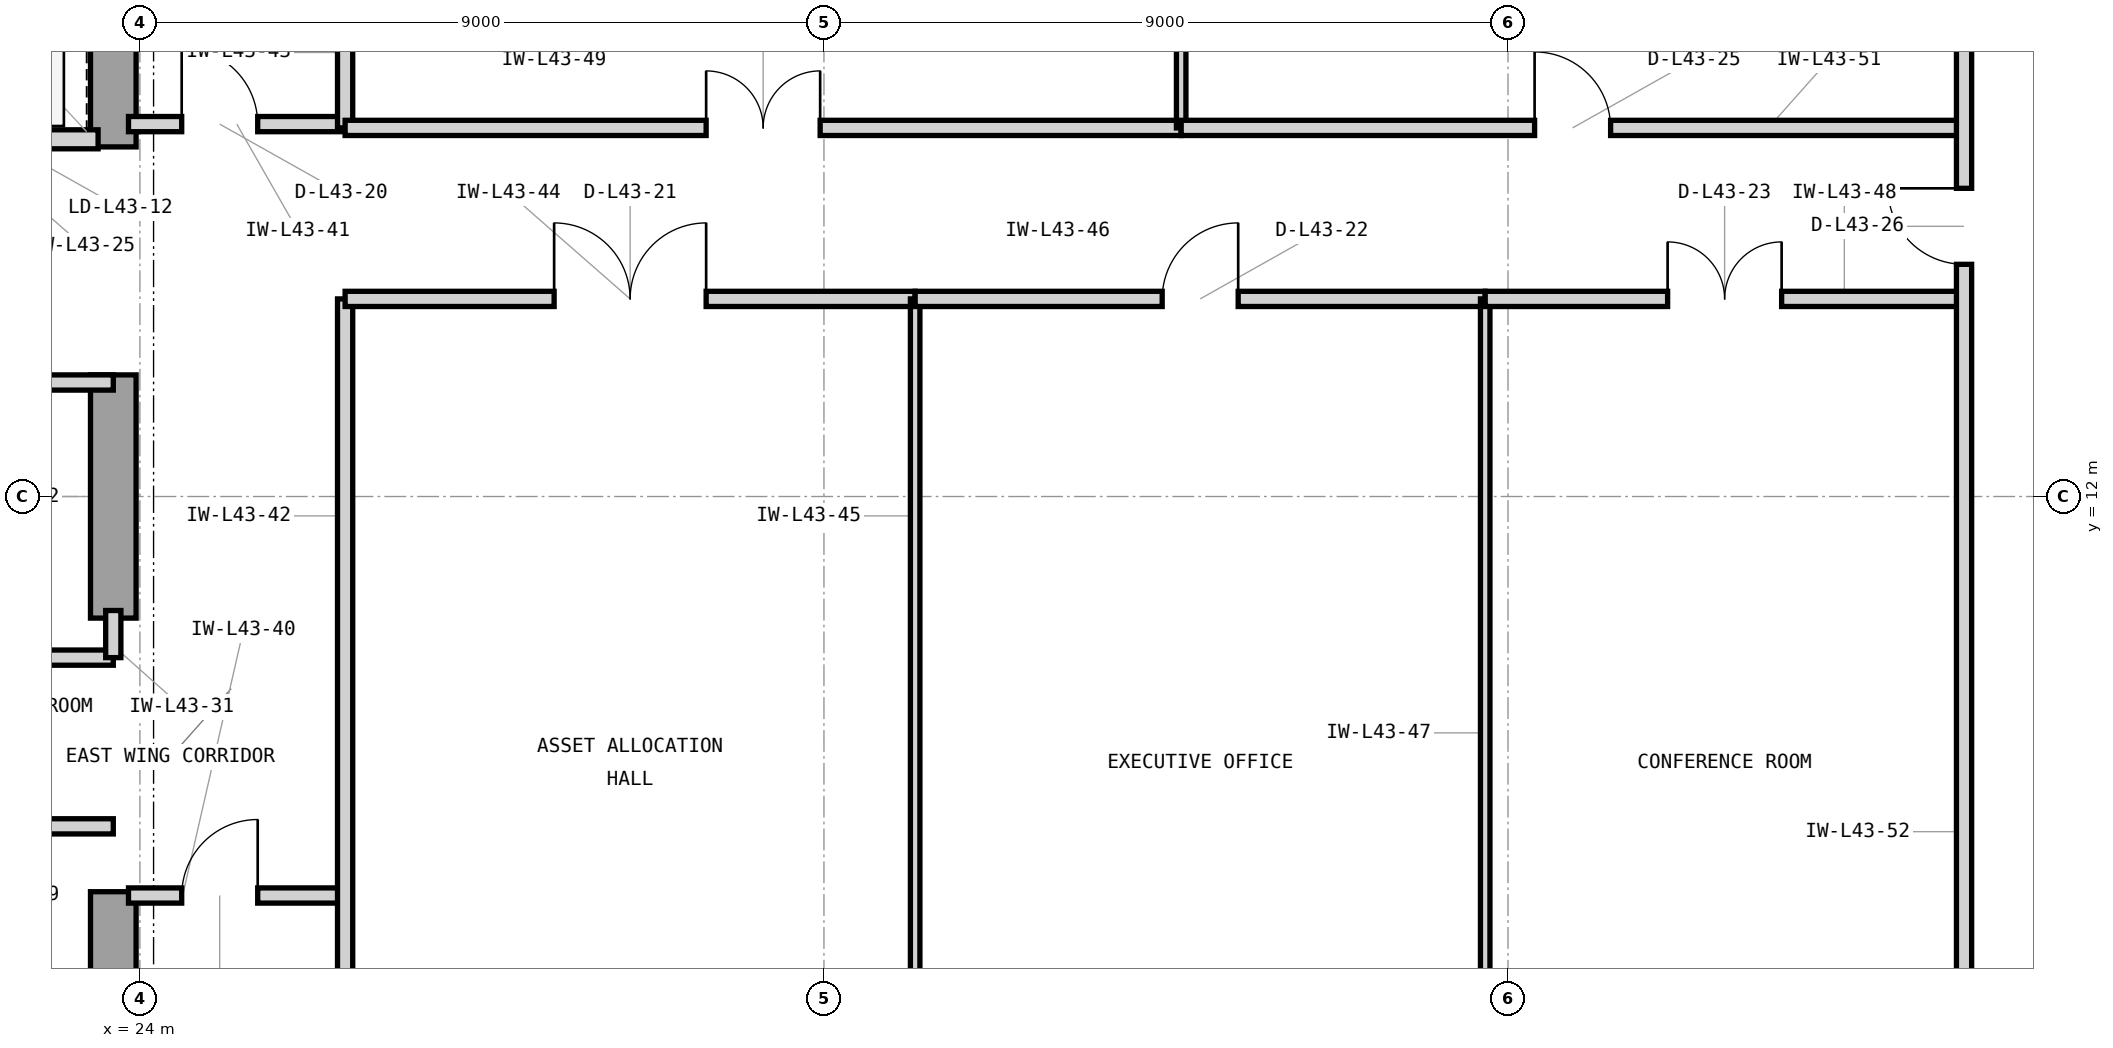
"""IFC4 building model, lengths in metres.
Left out: names, types, materials, properties, quantities, classifications, styles, units other than length and angle.
Written with IfcOpenShell. Run it as: python <this file> out.ifc"""

import sys

from ifc_helpers import new_model, si_unit, direction, frame, frame_2d, origin, place, context, subcontext, project, spatial, rectangle, extrude, element, fill, save


model = new_model("IFC4")
c1 = context("Model", 3, precision=1e-05, world=origin(), true_north=direction((0.0, 1.0)))
c2 = subcontext(c1, "Body", "Model", "MODEL_VIEW")
j1 = project(units=[si_unit("LENGTHUNIT", "METRE"), si_unit("PLANEANGLEUNIT", "RADIAN")], contexts=[c1])
p1 = place(None, origin())
s1 = spatial("IfcSite", under=j1, at=p1, CompositionType="ELEMENT")
p2 = place(p1, origin())
s2 = spatial("IfcBuilding", under=s1, at=p2, CompositionType="ELEMENT")
p3 = place(p2, frame((0.0, 0.0, 180.0)))
s3 = spatial("IfcBuildingStorey", under=s2, at=p3, CompositionType="ELEMENT", Elevation=180.0)
p4 = place(p3, frame((23.65, 3.65, 0.0), z_axis=(0.0, 0.0, 1.0), x_axis=(0.0, 1.0, 0.0)))
e1 = element("IfcWall", 1, at=p4, inside=s3, PredefinedType="SHEAR", context=c2, shape_type="SweptSolid", body=[
    extrude(rectangle(XDim=3.15, YDim=0.6, at=frame_2d((1.575, 0.0))), origin(), (0.0, 0.0, 1.0), 3.9),
])
p5 = place(p3, frame((23.65, 10.4, 0.0), z_axis=(0.0, 0.0, 1.0), x_axis=(0.0, 1.0, 0.0)))
e2 = element("IfcWall", 2, at=p5, inside=s3, PredefinedType="SHEAR", context=c2, shape_type="SweptSolid", body=[
    extrude(rectangle(XDim=3.2, YDim=0.6, at=frame_2d((1.6, 0.0))), origin(), (0.0, 0.0, 1.0), 3.9),
])
p6 = place(p3, frame((23.65, 16.6, 0.0), z_axis=(0.0, 0.0, 1.0), x_axis=(0.0, 1.0, 0.0)))
e3 = element("IfcWall", 3, at=p6, inside=s3, PredefinedType="SHEAR", context=c2, shape_type="SweptSolid", body=[
    extrude(rectangle(XDim=4.05, YDim=0.6, at=frame_2d((2.025, 0.0))), origin(), (0.0, 0.0, 1.0), 3.9),
])
p7 = place(p3, frame((21.05, 16.7, 0.0), z_axis=(0.0, 0.0, 1.0), x_axis=(1.0, 0.0, 0.0)))
e4 = element("IfcWall", 4, at=p7, inside=s3, PredefinedType="PARTITIONING", context=c2, shape_type="SweptSolid", body=[
    extrude(rectangle(XDim=2.4, YDim=0.25, at=frame_2d((1.2, 0.0))), origin(), (0.0, 0.0, 1.0), 3.283),
])
p8 = place(p7, frame((0.52, 0.0, 0.0)))
e5 = element("IfcOpeningElement", 5, at=p8, cuts=e4, PredefinedType="OPENING", context=c2, shape_type="SweptSolid", body=[
    extrude(rectangle(XDim=1.15, YDim=2.25, at=frame_2d((0.575, 1.125))), frame((0.0, 0.135, 0.0), z_axis=(0.0, -1.0, 0.0), x_axis=(1.0, 0.0, 0.0)), (0.0, 0.0, 1.0), 0.27),
])
p9 = place(p3, frame((20.85, 7.66, 0.0), z_axis=(0.0, 0.0, 1.0), x_axis=(1.0, 0.0, 0.0)))
e6 = element("IfcWall", 6, at=p9, inside=s3, PredefinedType="PARTITIONING", context=c2, shape_type="SweptSolid", body=[
    extrude(rectangle(XDim=2.8, YDim=0.2, at=frame_2d((1.4, 0.0))), origin(), (0.0, 0.0, 1.0), 3.69),
])
p10 = place(p9, frame((0.95, 0.0, 0.0)))
e7 = element("IfcOpeningElement", 7, at=p10, cuts=e6, PredefinedType="OPENING", context=c2, shape_type="SweptSolid", body=[
    extrude(rectangle(XDim=0.9, YDim=2.1, at=frame_2d((0.45, 1.05))), frame((0.0, 0.11, 0.0), z_axis=(0.0, -1.0, 0.0), x_axis=(1.0, 0.0, 0.0)), (0.0, 0.0, 1.0), 0.22),
])
p11 = place(p3, frame((14.825, 9.88, 0.0), z_axis=(0.0, 0.0, 1.0), x_axis=(1.0, 0.0, 0.0)))
e8 = element("IfcWall", 8, at=p11, inside=s3, PredefinedType="PARTITIONING", context=c2, shape_type="SweptSolid", body=[
    extrude(rectangle(XDim=8.825, YDim=0.2, at=frame_2d((4.413, 0.0))), origin(), (0.0, 0.0, 1.0), 3.69),
])
p12 = place(p3, frame((23.65, 9.88, 0.0), z_axis=(0.0, 0.0, 1.0), x_axis=(0.0, 1.0, 0.0)))
e9 = element("IfcWall", 9, at=p12, inside=s3, PredefinedType="PARTITIONING", context=c2, shape_type="SweptSolid", body=[
    extrude(rectangle(XDim=0.62, YDim=0.2, at=frame_2d((0.31, 0.0))), origin(), (0.0, 0.0, 1.0), 3.69),
])
p13 = place(p3, frame((19.9, 13.5, 0.0), z_axis=(0.0, 0.0, 1.0), x_axis=(1.0, 0.0, 0.0)))
e10 = element("IfcWall", 10, at=p13, inside=s3, PredefinedType="PARTITIONING", context=c2, shape_type="SweptSolid", body=[
    extrude(rectangle(XDim=3.75, YDim=0.2, at=frame_2d((1.875, 0.0))), origin(), (0.0, 0.0, 1.0), 3.283),
])
p14 = place(p13, frame((1.4, 0.0, 0.0)))
e11 = element("IfcOpeningElement", 11, at=p14, cuts=e10, PredefinedType="OPENING", context=c2, shape_type="SweptSolid", body=[
    extrude(rectangle(XDim=0.95, YDim=2.1, at=frame_2d((0.475, 1.05))), frame((0.0, 0.11, 0.0), z_axis=(0.0, -1.0, 0.0), x_axis=(1.0, 0.0, 0.0)), (0.0, 0.0, 1.0), 0.22),
])
p15 = place(p3, frame((23.85, 6.75, 0.0), z_axis=(0.0, 0.0, 1.0), x_axis=(1.0, 0.0, 0.0)))
e12 = element("IfcWall", 12, at=p15, inside=s3, PredefinedType="PARTITIONING", context=c2, shape_type="SweptSolid", body=[
    extrude(rectangle(XDim=2.85, YDim=0.2, at=frame_2d((1.425, 0.0))), origin(), (0.0, 0.0, 1.0), 3.69),
])
p16 = place(p15, frame((0.7, 0.0, 0.0)))
e13 = element("IfcOpeningElement", 13, at=p16, cuts=e12, PredefinedType="OPENING", context=c2, shape_type="SweptSolid", body=[
    extrude(rectangle(XDim=1.0, YDim=2.15, at=frame_2d((0.5, 1.075))), frame((0.0, 0.11, 0.0), z_axis=(0.0, -1.0, 0.0), x_axis=(1.0, 0.0, 0.0)), (0.0, 0.0, 1.0), 0.22),
])
p17 = place(p3, frame((23.85, 16.9, 0.0), z_axis=(0.0, 0.0, 1.0), x_axis=(1.0, 0.0, 0.0)))
e14 = element("IfcWall", 14, at=p17, inside=s3, PredefinedType="PARTITIONING", context=c2, shape_type="SweptSolid", body=[
    extrude(rectangle(XDim=2.85, YDim=0.2, at=frame_2d((1.425, 0.0))), origin(), (0.0, 0.0, 1.0), 3.69),
])
p18 = place(p17, frame((0.7, 0.0, 0.0)))
e15 = element("IfcOpeningElement", 15, at=p18, cuts=e14, PredefinedType="OPENING", context=c2, shape_type="SweptSolid", body=[
    extrude(rectangle(XDim=1.0, YDim=2.15, at=frame_2d((0.5, 1.075))), frame((0.0, 0.11, 0.0), z_axis=(0.0, -1.0, 0.0), x_axis=(1.0, 0.0, 0.0)), (0.0, 0.0, 1.0), 0.22),
])
p19 = place(p3, frame((26.7, 3.18, 0.0), z_axis=(0.0, 0.0, 1.0), x_axis=(0.0, 1.0, 0.0)))
e16 = element("IfcWall", 16, at=p19, inside=s3, PredefinedType="PARTITIONING", context=c2, shape_type="SweptSolid", body=[
    extrude(rectangle(XDim=11.42, YDim=0.2, at=frame_2d((5.71, 0.0))), origin(), (0.0, 0.0, 1.0), 3.69),
])
p20 = place(p3, frame((26.7, 16.85, 0.0), z_axis=(0.0, 0.0, 1.0), x_axis=(0.0, 1.0, 0.0)))
e17 = element("IfcWall", 17, at=p20, inside=s3, PredefinedType="PARTITIONING", context=c2, shape_type="SweptSolid", body=[
    extrude(rectangle(XDim=3.97, YDim=0.2, at=frame_2d((1.985, 0.0))), origin(), (0.0, 0.0, 1.0), 3.69),
])
p21 = place(p3, frame((26.7, 14.6, 0.0), z_axis=(0.0, 0.0, 1.0), x_axis=(1.0, 0.0, 0.0)))
e18 = element("IfcWall", 18, at=p21, inside=s3, PredefinedType="PARTITIONING", context=c2, shape_type="SweptSolid", body=[
    extrude(rectangle(XDim=7.5, YDim=0.2, at=frame_2d((3.75, 0.0))), origin(), (0.0, 0.0, 1.0), 3.69),
])
p22 = place(p21, frame((2.75, 0.0, 0.0)))
e19 = element("IfcOpeningElement", 19, at=p22, cuts=e18, PredefinedType="OPENING", context=c2, shape_type="SweptSolid", body=[
    extrude(rectangle(XDim=2.0, YDim=2.5, at=frame_2d((1.0, 1.25))), frame((0.0, 0.11, 0.0), z_axis=(0.0, -1.0, 0.0), x_axis=(1.0, 0.0, 0.0)), (0.0, 0.0, 1.0), 0.22),
])
p23 = place(p3, frame((34.2, 3.18, 0.0), z_axis=(0.0, 0.0, 1.0), x_axis=(0.0, 1.0, 0.0)))
e20 = element("IfcWall", 20, at=p23, inside=s3, PredefinedType="PARTITIONING", context=c2, shape_type="SweptSolid", body=[
    extrude(rectangle(XDim=11.42, YDim=0.125, at=frame_2d((5.71, 0.0))), origin(), (0.0, 0.0, 1.0), 3.69),
])
p24 = place(p3, frame((34.2, 14.6, 0.0), z_axis=(0.0, 0.0, 1.0), x_axis=(1.0, 0.0, 0.0)))
e21 = element("IfcWall", 21, at=p24, inside=s3, PredefinedType="PARTITIONING", context=c2, shape_type="SweptSolid", body=[
    extrude(rectangle(XDim=7.5, YDim=0.2, at=frame_2d((3.75, 0.0))), origin(), (0.0, 0.0, 1.0), 3.69),
])
p25 = place(p24, frame((3.25, 0.0, 0.0)))
e22 = element("IfcOpeningElement", 22, at=p25, cuts=e21, PredefinedType="OPENING", context=c2, shape_type="SweptSolid", body=[
    extrude(rectangle(XDim=1.0, YDim=2.15, at=frame_2d((0.5, 1.075))), frame((0.0, 0.11, 0.0), z_axis=(0.0, -1.0, 0.0), x_axis=(1.0, 0.0, 0.0)), (0.0, 0.0, 1.0), 0.22),
])
p26 = place(p3, frame((41.7, 3.18, 0.0), z_axis=(0.0, 0.0, 1.0), x_axis=(0.0, 1.0, 0.0)))
e23 = element("IfcWall", 23, at=p26, inside=s3, PredefinedType="PARTITIONING", context=c2, shape_type="SweptSolid", body=[
    extrude(rectangle(XDim=11.42, YDim=0.125, at=frame_2d((5.71, 0.0))), origin(), (0.0, 0.0, 1.0), 3.69),
])
p27 = place(p3, frame((41.7, 14.6, 0.0), z_axis=(0.0, 0.0, 1.0), x_axis=(1.0, 0.0, 0.0)))
e24 = element("IfcWall", 24, at=p27, inside=s3, PredefinedType="PARTITIONING", context=c2, shape_type="SweptSolid", body=[
    extrude(rectangle(XDim=6.3, YDim=0.2, at=frame_2d((3.15, 0.0))), origin(), (0.0, 0.0, 1.0), 3.69),
])
p28 = place(p27, frame((2.4, 0.0, 0.0)))
e25 = element("IfcOpeningElement", 25, at=p28, cuts=e24, PredefinedType="OPENING", context=c2, shape_type="SweptSolid", body=[
    extrude(rectangle(XDim=1.5, YDim=2.3, at=frame_2d((0.75, 1.15))), frame((0.0, 0.11, 0.0), z_axis=(0.0, -1.0, 0.0), x_axis=(1.0, 0.0, 0.0)), (0.0, 0.0, 1.0), 0.22),
])
p29 = place(p3, frame((26.7, 16.85, 0.0), z_axis=(0.0, 0.0, 1.0), x_axis=(1.0, 0.0, 0.0)))
e26 = element("IfcWall", 26, at=p29, inside=s3, PredefinedType="PARTITIONING", context=c2, shape_type="SweptSolid", body=[
    extrude(rectangle(XDim=11.0, YDim=0.2, at=frame_2d((5.5, 0.0))), origin(), (0.0, 0.0, 1.0), 3.69),
])
p30 = place(p29, frame((4.75, 0.0, 0.0)))
e27 = element("IfcOpeningElement", 27, at=p30, cuts=e26, PredefinedType="OPENING", context=c2, shape_type="SweptSolid", body=[
    extrude(rectangle(XDim=1.5, YDim=2.3, at=frame_2d((0.75, 1.15))), frame((0.0, 0.11, 0.0), z_axis=(0.0, -1.0, 0.0), x_axis=(1.0, 0.0, 0.0)), (0.0, 0.0, 1.0), 0.22),
])
p31 = place(p3, frame((37.7, 16.85, 0.0), z_axis=(0.0, 0.0, 1.0), x_axis=(0.0, 1.0, 0.0)))
e28 = element("IfcWall", 28, at=p31, inside=s3, PredefinedType="PARTITIONING", context=c2, shape_type="SweptSolid", body=[
    extrude(rectangle(XDim=3.97, YDim=0.125, at=frame_2d((1.985, 0.0))), origin(), (0.0, 0.0, 1.0), 3.69),
])
p32 = place(p3, frame((37.7, 16.85, 0.0), z_axis=(0.0, 0.0, 1.0), x_axis=(1.0, 0.0, 0.0)))
e29 = element("IfcWall", 29, at=p32, inside=s3, PredefinedType="PARTITIONING", context=c2, shape_type="SweptSolid", body=[
    extrude(rectangle(XDim=10.3, YDim=0.2, at=frame_2d((5.15, 0.0))), origin(), (0.0, 0.0, 1.0), 3.69),
])
p33 = place(p32, frame((4.65, 0.0, 0.0)))
e30 = element("IfcOpeningElement", 30, at=p33, cuts=e29, PredefinedType="OPENING", context=c2, shape_type="SweptSolid", body=[
    extrude(rectangle(XDim=1.0, YDim=2.15, at=frame_2d((0.5, 1.075))), frame((0.0, 0.11, 0.0), z_axis=(0.0, -1.0, 0.0), x_axis=(1.0, 0.0, 0.0)), (0.0, 0.0, 1.0), 0.22),
])
p34 = place(p3, frame((48.0, 3.18, 0.0), z_axis=(0.0, 0.0, 1.0), x_axis=(0.0, 1.0, 0.0)))
e31 = element("IfcWall", 31, at=p34, inside=s3, PredefinedType="PARTITIONING", context=c2, shape_type="SweptSolid", body=[
    extrude(rectangle(XDim=17.64, YDim=0.2, at=frame_2d((8.82, 0.0))), origin(), (0.0, 0.0, 1.0), 3.073),
])
p35 = place(p34, frame((11.875, 0.0, 0.0)))
e32 = element("IfcOpeningElement", 32, at=p35, cuts=e31, PredefinedType="OPENING", context=c2, shape_type="SweptSolid", body=[
    extrude(rectangle(XDim=1.0, YDim=2.15, at=frame_2d((0.5, 1.075))), frame((0.0, 0.11, 0.0), z_axis=(0.0, -1.0, 0.0), x_axis=(1.0, 0.0, 0.0)), (0.0, 0.0, 1.0), 0.22),
])
p36 = place(p16, origin())
e33 = element("IfcDoor", 33, at=p36, inside=s3, OperationType="SINGLE_SWING_RIGHT", PredefinedType="DOOR", context=c2, shape_type="SweptSolid", body=[
    extrude(rectangle(XDim=1.0, YDim=2.15, at=frame_2d((0.5, 1.075))), frame((0.0, 0.025, 0.0), z_axis=(0.0, -1.0, 0.0), x_axis=(1.0, 0.0, 0.0)), (0.0, 0.0, 1.0), 0.05),
])
fill(e13, e33)
p37 = place(p18, origin())
e34 = element("IfcDoor", 34, at=p37, inside=s3, OperationType="SINGLE_SWING_LEFT", PredefinedType="DOOR", context=c2, shape_type="SweptSolid", body=[
    extrude(rectangle(XDim=1.0, YDim=2.15, at=frame_2d((0.5, 1.075))), frame((0.0, 0.025, 0.0), z_axis=(0.0, -1.0, 0.0), x_axis=(1.0, 0.0, 0.0)), (0.0, 0.0, 1.0), 0.05),
])
fill(e15, e34)
p38 = place(p22, origin())
e35 = element("IfcDoor", 35, at=p38, inside=s3, OperationType="DOUBLE_DOOR_SINGLE_SWING", PredefinedType="DOOR", context=c2, shape_type="SweptSolid", body=[
    extrude(rectangle(XDim=2.0, YDim=2.5, at=frame_2d((1.0, 1.25))), frame((0.0, 0.025, 0.0), z_axis=(0.0, -1.0, 0.0), x_axis=(1.0, 0.0, 0.0)), (0.0, 0.0, 1.0), 0.05),
])
fill(e19, e35)
p39 = place(p25, origin())
e36 = element("IfcDoor", 36, at=p39, inside=s3, OperationType="SINGLE_SWING_RIGHT", PredefinedType="DOOR", context=c2, shape_type="SweptSolid", body=[
    extrude(rectangle(XDim=1.0, YDim=2.15, at=frame_2d((0.5, 1.075))), frame((0.0, 0.025, 0.0), z_axis=(0.0, -1.0, 0.0), x_axis=(1.0, 0.0, 0.0)), (0.0, 0.0, 1.0), 0.05),
])
fill(e22, e36)
p40 = place(p28, origin())
e37 = element("IfcDoor", 37, at=p40, inside=s3, OperationType="DOUBLE_DOOR_SINGLE_SWING", PredefinedType="DOOR", context=c2, shape_type="SweptSolid", body=[
    extrude(rectangle(XDim=1.5, YDim=2.3, at=frame_2d((0.75, 1.15))), frame((0.0, 0.025, 0.0), z_axis=(0.0, -1.0, 0.0), x_axis=(1.0, 0.0, 0.0)), (0.0, 0.0, 1.0), 0.05),
])
fill(e25, e37)
p41 = place(p30, origin())
e38 = element("IfcDoor", 38, at=p41, inside=s3, OperationType="DOUBLE_DOOR_SINGLE_SWING", PredefinedType="DOOR", context=c2, shape_type="SweptSolid", body=[
    extrude(rectangle(XDim=1.5, YDim=2.3, at=frame_2d((0.75, 1.15))), frame((0.0, 0.025, 0.0), z_axis=(0.0, -1.0, 0.0), x_axis=(1.0, 0.0, 0.0)), (0.0, 0.0, 1.0), 0.05),
])
fill(e27, e38)
p42 = place(p33, origin())
e39 = element("IfcDoor", 39, at=p42, inside=s3, OperationType="SINGLE_SWING_LEFT", PredefinedType="DOOR", context=c2, shape_type="SweptSolid", body=[
    extrude(rectangle(XDim=1.0, YDim=2.15, at=frame_2d((0.5, 1.075))), frame((0.0, 0.025, 0.0), z_axis=(0.0, -1.0, 0.0), x_axis=(1.0, 0.0, 0.0)), (0.0, 0.0, 1.0), 0.05),
])
fill(e30, e39)
p43 = place(p35, origin())
e40 = element("IfcDoor", 40, at=p43, inside=s3, OperationType="SINGLE_SWING_RIGHT", PredefinedType="DOOR", context=c2, shape_type="SweptSolid", body=[
    extrude(rectangle(XDim=1.0, YDim=2.15, at=frame_2d((0.5, 1.075))), frame((0.0, 0.025, 0.0), z_axis=(0.0, -1.0, 0.0), x_axis=(1.0, 0.0, 0.0)), (0.0, 0.0, 1.0), 0.05),
])
fill(e32, e40)
save(model, sys.argv[1])
